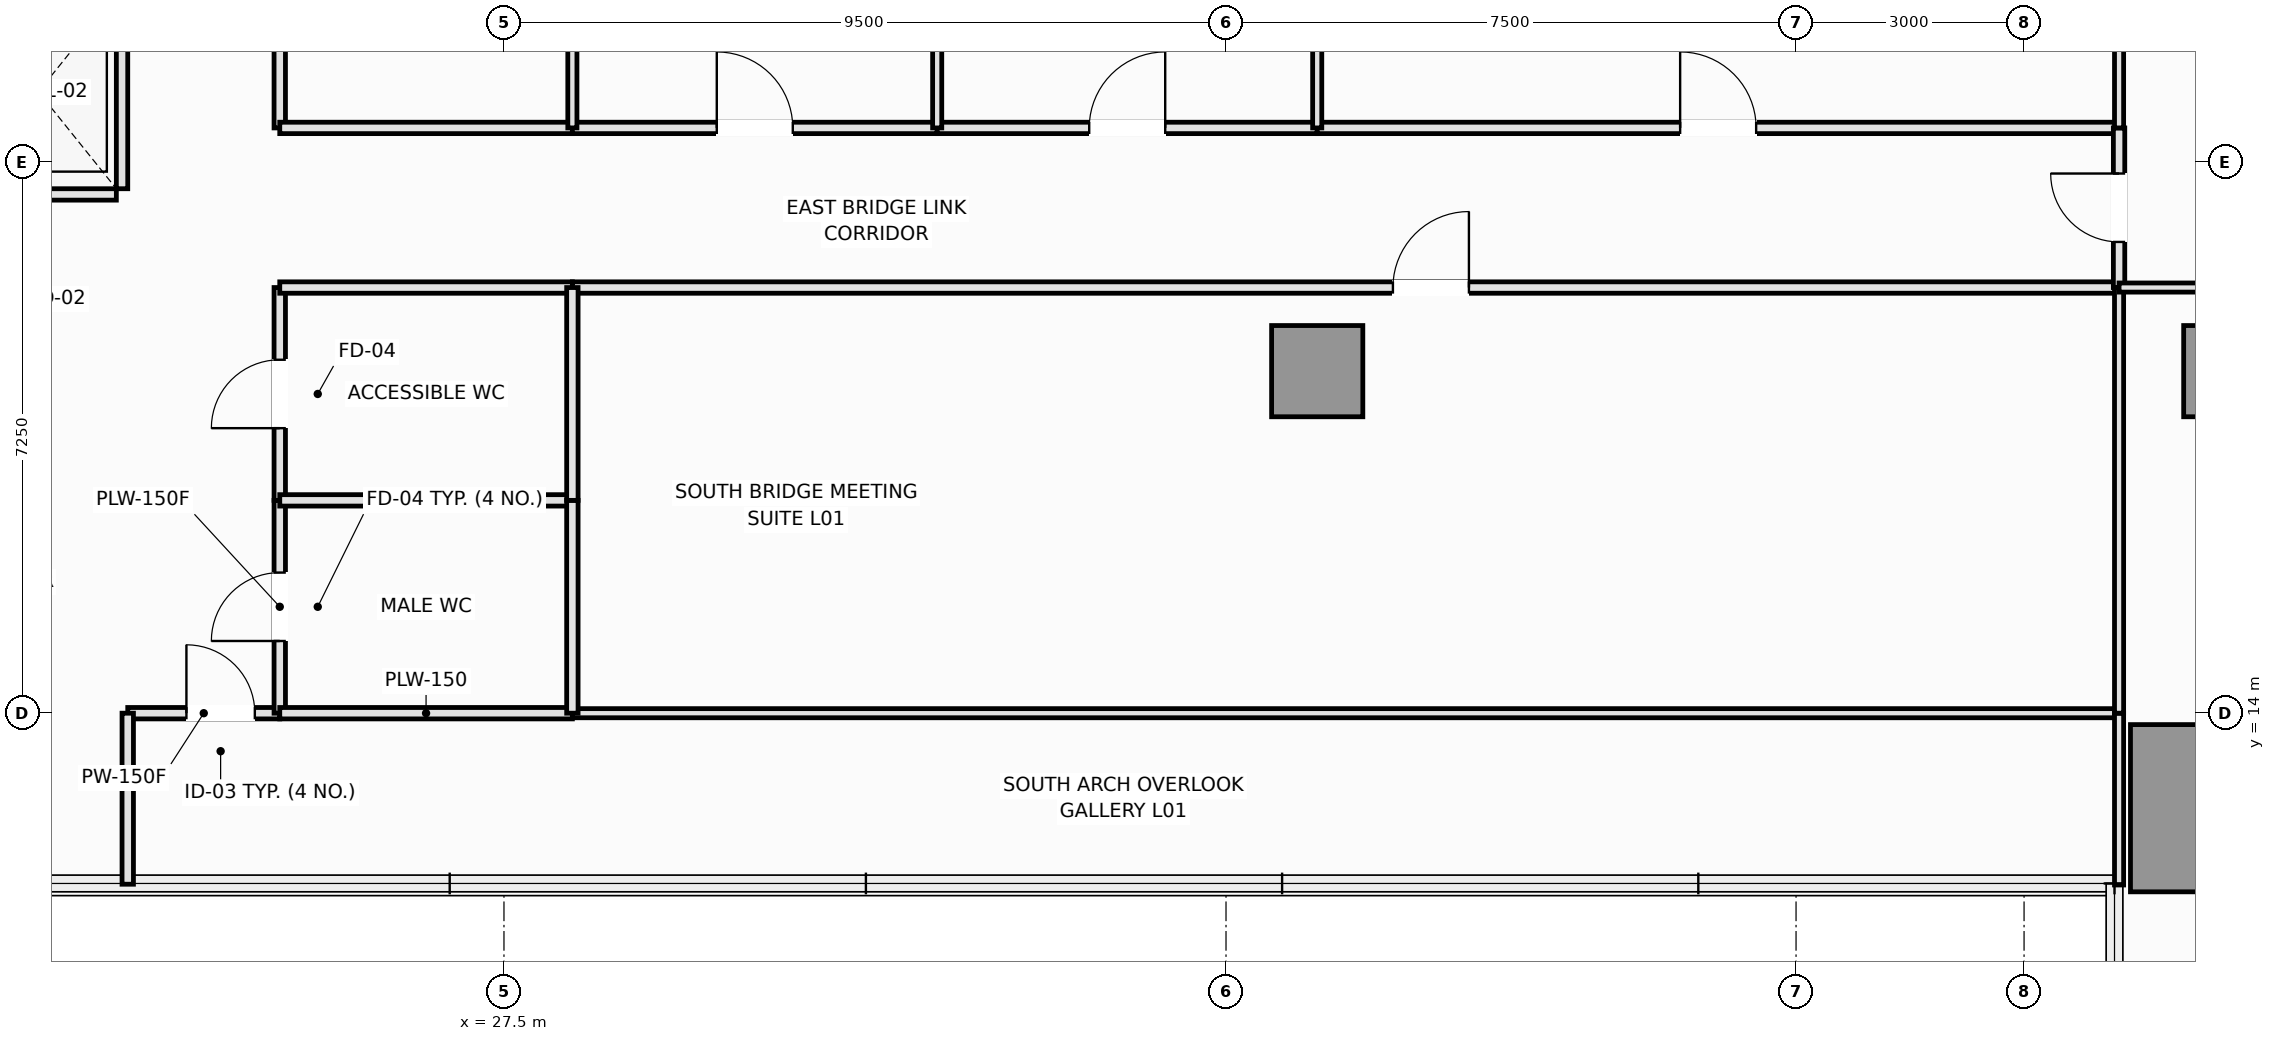
"""IFC4 building model, lengths in metres.
Left out: names, types, materials, properties, quantities, classifications, styles, units other than length and angle.
Written with IfcOpenShell. Run it as: python <this file> out.ifc"""

import sys

from ifc_helpers import new_model, si_unit, direction, frame, frame_2d, origin, origin_2d, place, context, subcontext, project, spatial, rectangle, extrude, element, fill, save


model = new_model("IFC4")
c1 = context("Model", 3, precision=1e-05, world=origin(), true_north=direction((0.0, 1.0)))
c2 = subcontext(c1, "Body", "Model", "MODEL_VIEW")
j1 = project(units=[si_unit("LENGTHUNIT", "METRE"), si_unit("PLANEANGLEUNIT", "RADIAN")], contexts=[c1])
p1 = place(None, origin())
s1 = spatial("IfcSite", under=j1, at=p1, CompositionType="ELEMENT")
p2 = place(p1, origin())
s2 = spatial("IfcBuilding", under=s1, at=p2, CompositionType="ELEMENT")
p3 = place(p2, frame((0.0, 0.0, 6.0)))
s3 = spatial("IfcBuildingStorey", under=s2, at=p3, CompositionType="ELEMENT", Elevation=6.0)
p4 = place(p3, frame((38.2, 18.5, 0.0), z_axis=(0.0, 0.0, 1.0), x_axis=(1.0, 0.0, 0.0)))
e1 = element("IfcColumn", 1, at=p4, inside=s3, PredefinedType="COLUMN", context=c2, shape_type="SweptSolid", body=[
    extrude(rectangle(XDim=1.2, YDim=1.2, at=origin_2d()), origin(), (0.0, 0.0, 1.0), 4.8),
])
p5 = place(p3, frame((50.2, 12.75, 0.0), z_axis=(0.0, 0.0, 1.0), x_axis=(1.0, 0.0, 0.0)))
e2 = element("IfcColumn", 2, at=p5, inside=s3, PredefinedType="COLUMN", context=c2, shape_type="SweptSolid", body=[
    extrude(rectangle(XDim=2.6, YDim=2.2, at=origin_2d()), origin(), (0.0, 0.0, 1.0), 4.8),
])
p6 = place(p3, frame((50.2, 18.5, 0.0), z_axis=(0.0, 0.0, 1.0), x_axis=(1.0, 0.0, 0.0)))
e3 = element("IfcColumn", 3, at=p6, inside=s3, PredefinedType="COLUMN", context=c2, shape_type="SweptSolid", body=[
    extrude(rectangle(XDim=1.2, YDim=1.2, at=origin_2d()), origin(), (0.0, 0.0, 1.0), 4.8),
])
p7 = place(p3, frame((20.35, 20.825, 0.0), z_axis=(0.0, 0.0, 1.0), x_axis=(1.0, 0.0, 0.0)))
e4 = element("IfcWall", 4, at=p7, inside=s3, PredefinedType="PARTITIONING", context=c2, shape_type="SweptSolid", body=[
    extrude(rectangle(XDim=2.05, YDim=0.15, at=frame_2d((1.025, 0.0))), origin(), (0.0, 0.0, 1.0), 4.6),
])
p8 = place(p3, frame((22.475, 20.9, 0.0), z_axis=(0.0, 0.0, 1.0), x_axis=(0.0, 1.0, 0.0)))
e5 = element("IfcWall", 5, at=p8, inside=s3, PredefinedType="PARTITIONING", context=c2, shape_type="SweptSolid", body=[
    extrude(rectangle(XDim=2.55, YDim=0.15, at=frame_2d((1.275, 0.0))), origin(), (0.0, 0.0, 1.0), 4.6),
])
p9 = place(p3, frame((22.55, 14.0, 0.0), z_axis=(0.0, 0.0, 1.0), x_axis=(1.0, 0.0, 0.0)))
e6 = element("IfcWall", 6, at=p9, inside=s3, PredefinedType="PARTITIONING", context=c2, shape_type="SweptSolid", body=[
    extrude(rectangle(XDim=2.0, YDim=0.15, at=frame_2d((1.0, 0.0))), origin(), (0.0, 0.0, 1.0), 4.6),
])
p10 = place(p9, frame((0.772, 0.0, 0.0)))
e7 = element("IfcOpeningElement", 7, at=p10, cuts=e6, PredefinedType="OPENING", context=c2, shape_type="SweptSolid", body=[
    extrude(rectangle(XDim=0.9, YDim=2.1, at=frame_2d((0.45, 1.05))), frame((0.0, 0.085, 0.0), z_axis=(0.0, -1.0, 0.0), x_axis=(1.0, 0.0, 0.0)), (0.0, 0.0, 1.0), 0.17),
])
p11 = place(p3, frame((24.55, 14.0, 0.0), z_axis=(0.0, 0.0, 1.0), x_axis=(0.0, 1.0, 0.0)))
e8 = element("IfcWall", 8, at=p11, inside=s3, PredefinedType="PLUMBINGWALL", context=c2, shape_type="SweptSolid", body=[
    extrude(rectangle(XDim=2.8, YDim=0.15, at=frame_2d((1.4, 0.0))), origin(), (0.0, 0.0, 1.0), 4.6),
])
p12 = place(p11, frame((0.95, 0.0, 0.0)))
e9 = element("IfcOpeningElement", 9, at=p12, cuts=e8, PredefinedType="OPENING", context=c2, shape_type="SweptSolid", body=[
    extrude(rectangle(XDim=0.9, YDim=2.1, at=frame_2d((0.45, 1.05))), frame((0.0, 0.085, 0.0), z_axis=(0.0, -1.0, 0.0), x_axis=(1.0, 0.0, 0.0)), (0.0, 0.0, 1.0), 0.17),
])
p13 = place(p3, frame((24.55, 16.8, 0.0), z_axis=(0.0, 0.0, 1.0), x_axis=(0.0, 1.0, 0.0)))
e10 = element("IfcWall", 10, at=p13, inside=s3, PredefinedType="PLUMBINGWALL", context=c2, shape_type="SweptSolid", body=[
    extrude(rectangle(XDim=2.8, YDim=0.15, at=frame_2d((1.4, 0.0))), origin(), (0.0, 0.0, 1.0), 4.6),
])
p14 = place(p13, frame((0.95, 0.0, 0.0)))
e11 = element("IfcOpeningElement", 11, at=p14, cuts=e10, PredefinedType="OPENING", context=c2, shape_type="SweptSolid", body=[
    extrude(rectangle(XDim=0.9, YDim=2.1, at=frame_2d((0.45, 1.05))), frame((0.0, 0.085, 0.0), z_axis=(0.0, -1.0, 0.0), x_axis=(1.0, 0.0, 0.0)), (0.0, 0.0, 1.0), 0.17),
])
p15 = place(p3, frame((24.55, 21.7, 0.0), z_axis=(0.0, 0.0, 1.0), x_axis=(0.0, 1.0, 0.0)))
e12 = element("IfcWall", 12, at=p15, inside=s3, PredefinedType="PARTITIONING", context=c2, shape_type="SweptSolid", body=[
    extrude(rectangle(XDim=9.1, YDim=0.15, at=frame_2d((4.55, 0.0))), origin(), (0.0, 0.0, 1.0), 4.6),
])
p16 = place(p15, frame((4.05, 0.0, 0.0)))
e13 = element("IfcOpeningElement", 13, at=p16, cuts=e12, PredefinedType="OPENING", context=c2, shape_type="SweptSolid", body=[
    extrude(rectangle(XDim=1.0, YDim=2.15, at=frame_2d((0.5, 1.075))), frame((0.0, 0.085, 0.0), z_axis=(0.0, -1.0, 0.0), x_axis=(1.0, 0.0, 0.0)), (0.0, 0.0, 1.0), 0.17),
])
p17 = place(p3, frame((22.55, 11.75, 0.0), z_axis=(0.0, 0.0, 1.0), x_axis=(0.0, 1.0, 0.0)))
e14 = element("IfcWall", 14, at=p17, inside=s3, PredefinedType="PARTITIONING", context=c2, shape_type="SweptSolid", body=[
    extrude(rectangle(XDim=2.25, YDim=0.15, at=frame_2d((1.125, 0.0))), origin(), (0.0, 0.0, 1.0), 4.6),
])
p18 = place(p3, frame((24.55, 19.6, 0.0), z_axis=(0.0, 0.0, 1.0), x_axis=(1.0, 0.0, 0.0)))
e15 = element("IfcWall", 15, at=p18, inside=s3, PredefinedType="PLUMBINGWALL", context=c2, shape_type="SweptSolid", body=[
    extrude(rectangle(XDim=3.85, YDim=0.15, at=frame_2d((1.925, 0.0))), origin(), (0.0, 0.0, 1.0), 4.6),
])
p19 = place(p3, frame((28.4, 19.6, 0.0), z_axis=(0.0, 0.0, 1.0), x_axis=(1.0, 0.0, 0.0)))
e16 = element("IfcWall", 16, at=p19, inside=s3, PredefinedType="PARTITIONING", context=c2, shape_type="SweptSolid", body=[
    extrude(rectangle(XDim=20.35, YDim=0.15, at=frame_2d((10.175, 0.0))), origin(), (0.0, 0.0, 1.0), 4.6),
])
p20 = place(p19, frame((10.796, 0.0, 0.0)))
e17 = element("IfcOpeningElement", 17, at=p20, cuts=e16, PredefinedType="OPENING", context=c2, shape_type="SweptSolid", body=[
    extrude(rectangle(XDim=1.0, YDim=2.15, at=frame_2d((0.5, 1.075))), frame((0.0, 0.085, 0.0), z_axis=(0.0, -1.0, 0.0), x_axis=(1.0, 0.0, 0.0)), (0.0, 0.0, 1.0), 0.17),
])
p21 = place(p3, frame((24.55, 21.7, 0.0), z_axis=(0.0, 0.0, 1.0), x_axis=(1.0, 0.0, 0.0)))
e18 = element("IfcWall", 18, at=p21, inside=s3, PredefinedType="PARTITIONING", context=c2, shape_type="SweptSolid", body=[
    extrude(rectangle(XDim=3.85, YDim=0.15, at=frame_2d((1.925, 0.0))), origin(), (0.0, 0.0, 1.0), 4.6),
])
p22 = place(p3, frame((28.4, 21.7, 0.0), z_axis=(0.0, 0.0, 1.0), x_axis=(1.0, 0.0, 0.0)))
e19 = element("IfcWall", 19, at=p22, inside=s3, PredefinedType="PARTITIONING", context=c2, shape_type="SweptSolid", body=[
    extrude(rectangle(XDim=4.8, YDim=0.15, at=frame_2d((2.4, 0.0))), origin(), (0.0, 0.0, 1.0), 4.6),
])
p23 = place(p22, frame((1.9, 0.0, 0.0)))
e20 = element("IfcOpeningElement", 20, at=p23, cuts=e19, PredefinedType="OPENING", context=c2, shape_type="SweptSolid", body=[
    extrude(rectangle(XDim=1.0, YDim=2.15, at=frame_2d((0.5, 1.075))), frame((0.0, 0.085, 0.0), z_axis=(0.0, -1.0, 0.0), x_axis=(1.0, 0.0, 0.0)), (0.0, 0.0, 1.0), 0.17),
])
p24 = place(p3, frame((33.2, 21.7, 0.0), z_axis=(0.0, 0.0, 1.0), x_axis=(1.0, 0.0, 0.0)))
e21 = element("IfcWall", 21, at=p24, inside=s3, PredefinedType="PARTITIONING", context=c2, shape_type="SweptSolid", body=[
    extrude(rectangle(XDim=5.0, YDim=0.15, at=frame_2d((2.5, 0.0))), origin(), (0.0, 0.0, 1.0), 4.6),
])
p25 = place(p24, frame((2.0, 0.0, 0.0)))
e22 = element("IfcOpeningElement", 22, at=p25, cuts=e21, PredefinedType="OPENING", context=c2, shape_type="SweptSolid", body=[
    extrude(rectangle(XDim=1.0, YDim=2.15, at=frame_2d((0.5, 1.075))), frame((0.0, 0.085, 0.0), z_axis=(0.0, -1.0, 0.0), x_axis=(1.0, 0.0, 0.0)), (0.0, 0.0, 1.0), 0.17),
])
p26 = place(p3, frame((38.2, 21.7, 0.0), z_axis=(0.0, 0.0, 1.0), x_axis=(1.0, 0.0, 0.0)))
e23 = element("IfcWall", 23, at=p26, inside=s3, PredefinedType="PARTITIONING", context=c2, shape_type="SweptSolid", body=[
    extrude(rectangle(XDim=10.55, YDim=0.15, at=frame_2d((5.275, 0.0))), origin(), (0.0, 0.0, 1.0), 4.6),
])
p27 = place(p26, frame((4.775, 0.0, 0.0)))
e24 = element("IfcOpeningElement", 24, at=p27, cuts=e23, PredefinedType="OPENING", context=c2, shape_type="SweptSolid", body=[
    extrude(rectangle(XDim=1.0, YDim=2.15, at=frame_2d((0.5, 1.075))), frame((0.0, 0.085, 0.0), z_axis=(0.0, -1.0, 0.0), x_axis=(1.0, 0.0, 0.0)), (0.0, 0.0, 1.0), 0.17),
])
p28 = place(p3, frame((48.75, 19.6, 0.0), z_axis=(0.0, 0.0, 1.0), x_axis=(0.0, 1.0, 0.0)))
e25 = element("IfcWall", 25, at=p28, inside=s3, PredefinedType="PARTITIONING", context=c2, shape_type="SweptSolid", body=[
    extrude(rectangle(XDim=2.1, YDim=0.15, at=frame_2d((1.05, 0.0))), origin(), (0.0, 0.0, 1.0), 4.6),
])
p29 = place(p28, frame((0.6, 0.0, 0.0)))
e26 = element("IfcOpeningElement", 26, at=p29, cuts=e25, PredefinedType="OPENING", context=c2, shape_type="SweptSolid", body=[
    extrude(rectangle(XDim=0.9, YDim=2.1, at=frame_2d((0.45, 1.05))), frame((0.0, 0.085, 0.0), z_axis=(0.0, -1.0, 0.0), x_axis=(1.0, 0.0, 0.0)), (0.0, 0.0, 1.0), 0.17),
])
p30 = place(p3, frame((24.55, 14.0, 0.0), z_axis=(0.0, 0.0, 1.0), x_axis=(1.0, 0.0, 0.0)))
e27 = element("IfcWall", 27, at=p30, inside=s3, PredefinedType="PLUMBINGWALL", context=c2, shape_type="SweptSolid", body=[
    extrude(rectangle(XDim=3.85, YDim=0.15, at=frame_2d((1.925, 0.0))), origin(), (0.0, 0.0, 1.0), 4.6),
])
p31 = place(p3, frame((28.4, 14.0, 0.0), z_axis=(0.0, 0.0, 1.0), x_axis=(1.0, 0.0, 0.0)))
e28 = element("IfcWall", 28, at=p31, inside=s3, PredefinedType="PARTITIONING", context=c2, shape_type="SweptSolid", body=[
    extrude(rectangle(XDim=20.35, YDim=0.12, at=frame_2d((10.175, 0.0))), origin(), (0.0, 0.0, 1.0), 4.6),
])
p32 = place(p3, frame((48.75, 11.74, 0.0), z_axis=(0.0, 0.0, 1.0), x_axis=(0.0, 1.0, 0.0)))
e29 = element("IfcWall", 29, at=p32, inside=s3, PredefinedType="PARTITIONING", context=c2, shape_type="SweptSolid", body=[
    extrude(rectangle(XDim=2.26, YDim=0.12, at=frame_2d((1.13, 0.0))), origin(), (0.0, 0.0, 1.0), 4.0),
])
p33 = place(p3, frame((24.55, 16.8, 0.0), z_axis=(0.0, 0.0, 1.0), x_axis=(1.0, 0.0, 0.0)))
e30 = element("IfcWall", 30, at=p33, inside=s3, PredefinedType="PLUMBINGWALL", context=c2, shape_type="SweptSolid", body=[
    extrude(rectangle(XDim=3.85, YDim=0.15, at=frame_2d((1.925, 0.0))), origin(), (0.0, 0.0, 1.0), 4.6),
])
for number, where, z_axis, x_axis in (
    (31, (28.4, 14.0, 0.0), (0.0, 0.0, 1.0), (0.0, 1.0, 0.0)),
    (32, (28.4, 16.8, 0.0), (0.0, 0.0, 1.0), (0.0, 1.0, 0.0)),
):
    element("IfcWall", number, at=place(p3, frame(where, z_axis=z_axis, x_axis=x_axis)), inside=s3, PredefinedType="PLUMBINGWALL", context=c2, shape_type="SweptSolid", body=[
        extrude(rectangle(XDim=2.8, YDim=0.15, at=frame_2d((1.4, 0.0))), origin(), (0.0, 0.0, 1.0), 4.6),
    ])
p34 = place(p3, frame((48.75, 14.0, 0.0), z_axis=(0.0, 0.0, 1.0), x_axis=(0.0, 1.0, 0.0)))
e33 = element("IfcWall", 33, at=p34, inside=s3, PredefinedType="PARTITIONING", context=c2, shape_type="SweptSolid", body=[
    extrude(rectangle(XDim=5.6, YDim=0.12, at=frame_2d((2.8, 0.0))), origin(), (0.0, 0.0, 1.0), 4.6),
])
p35 = place(p3, frame((28.4, 21.7, 0.0), z_axis=(0.0, 0.0, 1.0), x_axis=(0.0, 1.0, 0.0)))
e34 = element("IfcWall", 34, at=p35, inside=s3, PredefinedType="PARTITIONING", context=c2, shape_type="SweptSolid", body=[
    extrude(rectangle(XDim=9.1, YDim=0.12, at=frame_2d((4.55, 0.0))), origin(), (0.0, 0.0, 1.0), 4.6),
])
p36 = place(p3, frame((33.2, 21.7, 0.0), z_axis=(0.0, 0.0, 1.0), x_axis=(0.0, 1.0, 0.0)))
e35 = element("IfcWall", 35, at=p36, inside=s3, PredefinedType="PARTITIONING", context=c2, shape_type="SweptSolid", body=[
    extrude(rectangle(XDim=14.8, YDim=0.12, at=frame_2d((7.4, 0.0))), origin(), (0.0, 0.0, 1.0), 4.6),
])
p37 = place(p3, frame((38.2, 21.7, 0.0), z_axis=(0.0, 0.0, 1.0), x_axis=(0.0, 1.0, 0.0)))
e36 = element("IfcWall", 36, at=p37, inside=s3, PredefinedType="PARTITIONING", context=c2, shape_type="SweptSolid", body=[
    extrude(rectangle(XDim=14.8, YDim=0.12, at=frame_2d((7.4, 0.0))), origin(), (0.0, 0.0, 1.0), 4.0),
])
p38 = place(p3, frame((48.75, 21.7, 0.0), z_axis=(0.0, 0.0, 1.0), x_axis=(0.0, 1.0, 0.0)))
e37 = element("IfcWall", 37, at=p38, inside=s3, PredefinedType="PARTITIONING", context=c2, shape_type="SweptSolid", body=[
    extrude(rectangle(XDim=14.8, YDim=0.12, at=frame_2d((7.4, 0.0))), origin(), (0.0, 0.0, 1.0), 4.6),
])
p39 = place(p3, frame((48.75, 19.6, 0.0), z_axis=(0.0, 0.0, 1.0), x_axis=(1.0, 0.0, 0.0)))
e38 = element("IfcWall", 38, at=p39, inside=s3, PredefinedType="PARTITIONING", context=c2, shape_type="SweptSolid", body=[
    extrude(rectangle(XDim=9.05, YDim=0.12, at=frame_2d((4.525, 0.0))), origin(), (0.0, 0.0, 1.0), 4.6),
])
p40 = place(p39, frame((4.025, 0.0, 0.0)))
e39 = element("IfcOpeningElement", 39, at=p40, cuts=e38, PredefinedType="OPENING", context=c2, shape_type="SweptSolid", body=[
    extrude(rectangle(XDim=1.0, YDim=2.15, at=frame_2d((0.5, 1.075))), frame((0.0, 0.07, 0.0), z_axis=(0.0, -1.0, 0.0), x_axis=(1.0, 0.0, 0.0)), (0.0, 0.0, 1.0), 0.14),
])
p41 = place(p10, origin())
e40 = element("IfcDoor", 40, at=p41, inside=s3, OperationType="SINGLE_SWING_LEFT", PredefinedType="DOOR", context=c2, shape_type="SweptSolid", body=[
    extrude(rectangle(XDim=0.9, YDim=2.1, at=frame_2d((0.45, 1.05))), frame((0.0, 0.025, 0.0), z_axis=(0.0, -1.0, 0.0), x_axis=(1.0, 0.0, 0.0)), (0.0, 0.0, 1.0), 0.05),
])
fill(e7, e40)
p42 = place(p12, origin())
e41 = element("IfcDoor", 41, at=p42, inside=s3, OperationType="SINGLE_SWING_LEFT", PredefinedType="DOOR", context=c2, shape_type="SweptSolid", body=[
    extrude(rectangle(XDim=0.9, YDim=2.1, at=frame_2d((0.45, 1.05))), frame((0.0, 0.025, 0.0), z_axis=(0.0, -1.0, 0.0), x_axis=(1.0, 0.0, 0.0)), (0.0, 0.0, 1.0), 0.05),
])
fill(e9, e41)
p43 = place(p14, origin())
e42 = element("IfcDoor", 42, at=p43, inside=s3, OperationType="SINGLE_SWING_LEFT", PredefinedType="DOOR", context=c2, shape_type="SweptSolid", body=[
    extrude(rectangle(XDim=0.9, YDim=2.1, at=frame_2d((0.45, 1.05))), frame((0.0, 0.025, 0.0), z_axis=(0.0, -1.0, 0.0), x_axis=(1.0, 0.0, 0.0)), (0.0, 0.0, 1.0), 0.05),
])
fill(e11, e42)
p44 = place(p20, origin())
e43 = element("IfcDoor", 43, at=p44, inside=s3, OperationType="SINGLE_SWING_RIGHT", PredefinedType="DOOR", context=c2, shape_type="SweptSolid", body=[
    extrude(rectangle(XDim=1.0, YDim=2.15, at=frame_2d((0.5, 1.075))), frame((0.0, 0.025, 0.0), z_axis=(0.0, -1.0, 0.0), x_axis=(1.0, 0.0, 0.0)), (0.0, 0.0, 1.0), 0.05),
])
fill(e17, e43)
p45 = place(p23, origin())
e44 = element("IfcDoor", 44, at=p45, inside=s3, OperationType="SINGLE_SWING_LEFT", PredefinedType="DOOR", context=c2, shape_type="SweptSolid", body=[
    extrude(rectangle(XDim=1.0, YDim=2.15, at=frame_2d((0.5, 1.075))), frame((0.0, 0.025, 0.0), z_axis=(0.0, -1.0, 0.0), x_axis=(1.0, 0.0, 0.0)), (0.0, 0.0, 1.0), 0.05),
])
fill(e20, e44)
p46 = place(p25, origin())
e45 = element("IfcDoor", 45, at=p46, inside=s3, OperationType="SINGLE_SWING_RIGHT", PredefinedType="DOOR", context=c2, shape_type="SweptSolid", body=[
    extrude(rectangle(XDim=1.0, YDim=2.15, at=frame_2d((0.5, 1.075))), frame((0.0, 0.025, 0.0), z_axis=(0.0, -1.0, 0.0), x_axis=(1.0, 0.0, 0.0)), (0.0, 0.0, 1.0), 0.05),
])
fill(e22, e45)
p47 = place(p27, origin())
e46 = element("IfcDoor", 46, at=p47, inside=s3, OperationType="SINGLE_SWING_LEFT", PredefinedType="DOOR", context=c2, shape_type="SweptSolid", body=[
    extrude(rectangle(XDim=1.0, YDim=2.15, at=frame_2d((0.5, 1.075))), frame((0.0, 0.025, 0.0), z_axis=(0.0, -1.0, 0.0), x_axis=(1.0, 0.0, 0.0)), (0.0, 0.0, 1.0), 0.05),
])
fill(e24, e46)
p48 = place(p29, origin())
e47 = element("IfcDoor", 47, at=p48, inside=s3, OperationType="SINGLE_SWING_RIGHT", PredefinedType="DOOR", context=c2, shape_type="SweptSolid", body=[
    extrude(rectangle(XDim=0.9, YDim=2.1, at=frame_2d((0.45, 1.05))), frame((0.0, 0.025, 0.0), z_axis=(0.0, -1.0, 0.0), x_axis=(1.0, 0.0, 0.0)), (0.0, 0.0, 1.0), 0.05),
])
fill(e26, e47)
save(model, sys.argv[1])
